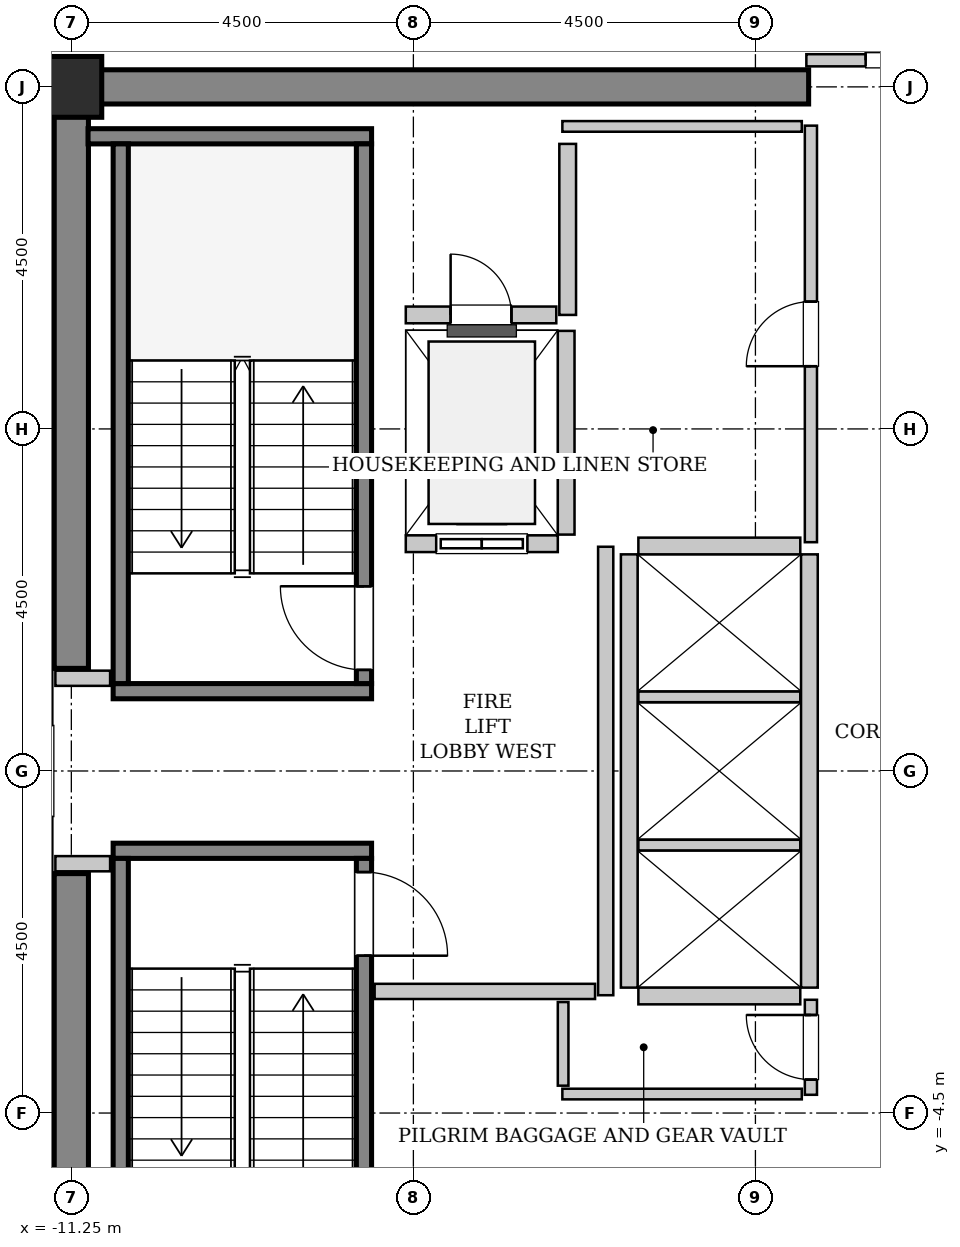
"""IFC4 building model, lengths in metres.
Left out: names, types, materials, properties, quantities, classifications, styles, units other than length and angle.
Written with IfcOpenShell. Run it as: python <this file> out.ifc"""

import sys

from ifc_helpers import new_model, si_unit, direction, frame, frame_2d, origin, origin_2d, place, context, subcontext, project, spatial, rectangle, hollow_rectangle, extrude, source, transform, mapped, element, fill, save


model = new_model("IFC4")
c1 = context("Model", 3, precision=1e-05, world=origin(), true_north=direction((0.0, 1.0)))
c2 = subcontext(c1, "Body", "Model", "MODEL_VIEW")
j1 = project(units=[si_unit("LENGTHUNIT", "METRE"), si_unit("PLANEANGLEUNIT", "RADIAN")], contexts=[c1])
p1 = place(None, origin())
s1 = spatial("IfcSite", under=j1, at=p1, CompositionType="ELEMENT")
p2 = place(p1, origin())
s2 = spatial("IfcBuilding", under=s1, at=p2, CompositionType="ELEMENT")
p3 = place(p2, frame((0.0, 0.0, 240.8)))
s3 = spatial("IfcBuildingStorey", under=s2, at=p3, CompositionType="ELEMENT", Elevation=240.8)
m1 = source(origin(), c2, "Body", "SweptSolid", [
    extrude(rectangle(XDim=9.925, YDim=0.45, at=frame_2d((4.962, 0.0))), origin(), (0.0, 0.0, 1.0), 3.8),
])
p4 = place(p3, frame((-11.475, 9.0, 0.0), z_axis=(0.0, 0.0, 1.0), x_axis=(1.0, 0.0, 0.0)))
e1 = element("IfcWall", 1, at=p4, inside=s3, PredefinedType="SHEAR", context=c2, shape_type="MappedRepresentation", body=[
    mapped(m1, transform((0.0, 0.0, 0.0), x_axis=(1.0, 0.0, 0.0), y_axis=(0.0, 1.0, 0.0), z_axis=(0.0, 0.0, 1.0), scale=1.0)),
])
m2 = source(origin(), c2, "Body", "SweptSolid", [
    extrude(rectangle(XDim=7.425, YDim=0.45, at=frame_2d((3.712, 0.0))), origin(), (0.0, 0.0, 1.0), 3.8),
])
for number, where, z_axis, x_axis in (
    (2, (-11.25, -8.775, 0.0), (0.0, 0.0, 1.0), (0.0, 1.0, 0.0)),
    (3, (-11.25, 1.35, 0.0), (0.0, 0.0, 1.0), (0.0, 1.0, 0.0)),
):
    element("IfcWall", number, at=place(p3, frame(where, z_axis=z_axis, x_axis=x_axis)), inside=s3, PredefinedType="SHEAR", context=c2, shape_type="MappedRepresentation", body=[
        mapped(m2, transform((0.0, 0.0, 0.0), x_axis=(1.0, 0.0, 0.0), y_axis=(0.0, 1.0, 0.0), z_axis=(0.0, 0.0, 1.0), scale=1.0)),
    ])
m3 = source(origin(), c2, "Body", "SweptSolid", [
    extrude(hollow_rectangle(XDim=0.8, YDim=0.8, WallThickness=0.04, InnerFilletRadius=0.04, OuterFilletRadius=0.08, at=origin_2d()), origin(), (0.0, 0.0, 1.0), 3.8),
])
p5 = place(p3, frame((-11.25, 9.0, 0.0), z_axis=(0.0, 0.0, 1.0), x_axis=(1.0, 0.0, 0.0)))
e4 = element("IfcColumn", 4, at=p5, inside=s3, PredefinedType="COLUMN", context=c2, shape_type="MappedRepresentation", body=[
    mapped(m3, transform((0.0, 0.0, 0.0), x_axis=(1.0, 0.0, 0.0), y_axis=(0.0, 1.0, 0.0), z_axis=(0.0, 0.0, 1.0), scale=1.0)),
])
m4 = source(origin(), c2, "Body", "SweptSolid", [
    extrude(rectangle(XDim=3.4, YDim=0.2, at=frame_2d((1.7, 0.0))), origin(), (0.0, 0.0, 1.0), 3.8),
])
p6 = place(p3, frame((-7.3, 1.05, 0.0), z_axis=(0.0, 0.0, 1.0), x_axis=(-1.0, 0.0, 0.0)))
e5 = element("IfcWall", 5, at=p6, inside=s3, PredefinedType="SOLIDWALL", context=c2, shape_type="MappedRepresentation", body=[
    mapped(m4, transform((0.0, 0.0, 0.0), x_axis=(1.0, 0.0, 0.0), y_axis=(0.0, 1.0, 0.0), z_axis=(0.0, 0.0, 1.0), scale=1.0)),
])
m5 = source(origin(), c2, "Body", "SweptSolid", [
    extrude(rectangle(XDim=3.73, YDim=0.2, at=frame_2d((1.865, 0.0))), origin(), (0.0, 0.0, 1.0), 3.8),
])
p7 = place(p3, frame((-7.3, 8.35, 0.0), z_axis=(0.0, 0.0, 1.0), x_axis=(-1.0, 0.0, 0.0)))
e6 = element("IfcWall", 6, at=p7, inside=s3, PredefinedType="SOLIDWALL", context=c2, shape_type="MappedRepresentation", body=[
    mapped(m5, transform((0.0, 0.0, 0.0), x_axis=(1.0, 0.0, 0.0), y_axis=(0.0, 1.0, 0.0), z_axis=(0.0, 0.0, 1.0), scale=1.0)),
])
m6 = source(origin(), c2, "Body", "SweptSolid", [
    extrude(rectangle(XDim=7.1, YDim=0.2, at=frame_2d((3.55, 0.0))), origin(), (0.0, 0.0, 1.0), 3.8),
])
p8 = place(p3, frame((-7.4, 1.15, 0.0), z_axis=(0.0, 0.0, 1.0), x_axis=(0.0, 1.0, 0.0)))
e7 = element("IfcWall", 7, at=p8, inside=s3, PredefinedType="SOLIDWALL", context=c2, shape_type="MappedRepresentation", body=[
    mapped(m6, transform((0.0, 0.0, 0.0), x_axis=(1.0, 0.0, 0.0), y_axis=(0.0, 1.0, 0.0), z_axis=(0.0, 0.0, 1.0), scale=1.0)),
])
p9 = place(p8, frame((0.18, 0.0, 0.0)))
e8 = element("IfcOpeningElement", 8, at=p9, cuts=e7, PredefinedType="OPENING", context=c2, shape_type="SweptSolid", body=[
    extrude(rectangle(XDim=1.1, YDim=2.15, at=frame_2d((0.55, 1.075))), frame((0.0, 0.11, 0.0), z_axis=(0.0, -1.0, 0.0), x_axis=(1.0, 0.0, 0.0)), (0.0, 0.0, 1.0), 0.22),
])
p10 = place(p3, frame((-10.6, 1.15, 0.0), z_axis=(0.0, 0.0, 1.0), x_axis=(0.0, 1.0, 0.0)))
e9 = element("IfcWall", 9, at=p10, inside=s3, PredefinedType="SOLIDWALL", context=c2, shape_type="MappedRepresentation", body=[
    mapped(m6, transform((0.0, 0.0, 0.0), x_axis=(1.0, 0.0, 0.0), y_axis=(0.0, 1.0, 0.0), z_axis=(0.0, 0.0, 1.0), scale=1.0)),
])
p11 = place(p3, frame((-10.7, -1.05, 0.0), z_axis=(0.0, 0.0, 1.0), x_axis=(1.0, 0.0, 0.0)))
e10 = element("IfcWall", 10, at=p11, inside=s3, PredefinedType="SOLIDWALL", context=c2, shape_type="MappedRepresentation", body=[
    mapped(m4, transform((0.0, 0.0, 0.0), x_axis=(1.0, 0.0, 0.0), y_axis=(0.0, 1.0, 0.0), z_axis=(0.0, 0.0, 1.0), scale=1.0)),
])
p12 = place(p3, frame((-10.6, -1.15, 0.0), z_axis=(0.0, 0.0, 1.0), x_axis=(0.0, -1.0, 0.0)))
e11 = element("IfcWall", 11, at=p12, inside=s3, PredefinedType="SOLIDWALL", context=c2, shape_type="MappedRepresentation", body=[
    mapped(m6, transform((0.0, 0.0, 0.0), x_axis=(1.0, 0.0, 0.0), y_axis=(0.0, 1.0, 0.0), z_axis=(0.0, 0.0, 1.0), scale=1.0)),
])
p13 = place(p3, frame((-7.4, -1.15, 0.0), z_axis=(0.0, 0.0, 1.0), x_axis=(0.0, -1.0, 0.0)))
e12 = element("IfcWall", 12, at=p13, inside=s3, PredefinedType="SOLIDWALL", context=c2, shape_type="MappedRepresentation", body=[
    mapped(m6, transform((0.0, 0.0, 0.0), x_axis=(1.0, 0.0, 0.0), y_axis=(0.0, 1.0, 0.0), z_axis=(0.0, 0.0, 1.0), scale=1.0)),
])
p14 = place(p13, frame((0.18, 0.0, 0.0)))
e13 = element("IfcOpeningElement", 13, at=p14, cuts=e12, PredefinedType="OPENING", context=c2, shape_type="SweptSolid", body=[
    extrude(rectangle(XDim=1.1, YDim=2.15, at=frame_2d((0.55, 1.075))), frame((0.0, 0.11, 0.0), z_axis=(0.0, -1.0, 0.0), x_axis=(1.0, 0.0, 0.0)), (0.0, 0.0, 1.0), 0.22),
])
m7 = source(origin(), c2, "Body", "SweptSolid", [
    extrude(rectangle(XDim=2.0, YDim=0.22, at=frame_2d((1.0, 0.0))), origin(), (0.0, 0.0, 1.0), 3.535),
])
p15 = place(p3, frame((-6.85, 2.99, 0.0), z_axis=(0.0, 0.0, 1.0), x_axis=(1.0, 0.0, 0.0)))
e14 = element("IfcWall", 14, at=p15, inside=s3, PredefinedType="SOLIDWALL", context=c2, shape_type="MappedRepresentation", body=[
    mapped(m7, transform((0.0, 0.0, 0.0), x_axis=(1.0, 0.0, 0.0), y_axis=(0.0, 1.0, 0.0), z_axis=(0.0, 0.0, 1.0), scale=1.0)),
])
p16 = place(p15, frame((0.4, 0.0, 0.0)))
e15 = element("IfcOpeningElement", 15, at=p16, cuts=e14, PredefinedType="OPENING", context=c2, shape_type="SweptSolid", body=[
    extrude(rectangle(XDim=1.2, YDim=2.2, at=frame_2d((0.6, 1.1))), frame((0.0, 0.12, 0.0), z_axis=(0.0, -1.0, 0.0), x_axis=(1.0, 0.0, 0.0)), (0.0, 0.0, 1.0), 0.24),
])
m8 = source(origin(), c2, "Body", "SweptSolid", [
    extrude(rectangle(XDim=2.68, YDim=0.22, at=frame_2d((1.34, 0.0))), origin(), (0.0, 0.0, 1.0), 3.535),
])
p17 = place(p3, frame((-4.74, 3.11, 0.0), z_axis=(0.0, 0.0, 1.0), x_axis=(0.0, 1.0, 0.0)))
e16 = element("IfcWall", 16, at=p17, inside=s3, PredefinedType="SOLIDWALL", context=c2, shape_type="MappedRepresentation", body=[
    mapped(m8, transform((0.0, 0.0, 0.0), x_axis=(1.0, 0.0, 0.0), y_axis=(0.0, 1.0, 0.0), z_axis=(0.0, 0.0, 1.0), scale=1.0)),
])
m9 = source(origin(), c2, "Body", "SweptSolid", [
    extrude(rectangle(XDim=5.7, YDim=0.22, at=frame_2d((2.85, 0.0))), origin(), (0.0, 0.0, 1.0), 3.535),
])
for number, where, z_axis, x_axis in (
    (17, (-1.54, -2.85, 0.0), (0.0, 0.0, 1.0), (0.0, 1.0, 0.0)),
    (18, (-3.91, 2.85, 0.0), (0.0, 0.0, 1.0), (0.0, -1.0, 0.0)),
):
    element("IfcWall", number, at=place(p3, frame(where, z_axis=z_axis, x_axis=x_axis)), inside=s3, PredefinedType="SOLIDWALL", context=c2, shape_type="MappedRepresentation", body=[
        mapped(m9, transform((0.0, 0.0, 0.0), x_axis=(1.0, 0.0, 0.0), y_axis=(0.0, 1.0, 0.0), z_axis=(0.0, 0.0, 1.0), scale=1.0)),
    ])
m10 = source(origin(), c2, "Body", "SweptSolid", [
    extrude(rectangle(XDim=2.13, YDim=0.22, at=frame_2d((1.065, 0.0))), origin(), (0.0, 0.0, 1.0), 3.535),
])
p18 = place(p3, frame((-3.79, -2.96, 0.0), z_axis=(0.0, 0.0, 1.0), x_axis=(1.0, 0.0, 0.0)))
e19 = element("IfcWall", 19, at=p18, inside=s3, PredefinedType="SOLIDWALL", context=c2, shape_type="MappedRepresentation", body=[
    mapped(m10, transform((0.0, 0.0, 0.0), x_axis=(1.0, 0.0, 0.0), y_axis=(0.0, 1.0, 0.0), z_axis=(0.0, 0.0, 1.0), scale=1.0)),
])
m11 = source(origin(), c2, "Body", "SweptSolid", [
    extrude(rectangle(XDim=2.13, YDim=0.14, at=frame_2d((1.065, 0.0))), origin(), (0.0, 0.0, 1.0), 3.535),
])
for number, where, z_axis, x_axis in (
    (20, (-3.79, -0.975, 0.0), (0.0, 0.0, 1.0), (1.0, 0.0, 0.0)),
    (21, (-3.79, 0.975, 0.0), (0.0, 0.0, 1.0), (1.0, 0.0, 0.0)),
):
    element("IfcWall", number, at=place(p3, frame(where, z_axis=z_axis, x_axis=x_axis)), inside=s3, PredefinedType="PARTITIONING", context=c2, shape_type="MappedRepresentation", body=[
        mapped(m11, transform((0.0, 0.0, 0.0), x_axis=(1.0, 0.0, 0.0), y_axis=(0.0, 1.0, 0.0), z_axis=(0.0, 0.0, 1.0), scale=1.0)),
    ])
p19 = place(p3, frame((-1.66, 2.96, 0.0), z_axis=(0.0, 0.0, 1.0), x_axis=(-1.0, 0.0, 0.0)))
e22 = element("IfcWall", 22, at=p19, inside=s3, PredefinedType="SOLIDWALL", context=c2, shape_type="MappedRepresentation", body=[
    mapped(m10, transform((0.0, 0.0, 0.0), x_axis=(1.0, 0.0, 0.0), y_axis=(0.0, 1.0, 0.0), z_axis=(0.0, 0.0, 1.0), scale=1.0)),
])
m12 = source(origin(), c2, "Body", "SweptSolid", [
    extrude(rectangle(XDim=2.25, YDim=0.22, at=frame_2d((1.125, 0.0))), origin(), (0.0, 0.0, 1.0), 3.535),
])
p20 = place(p3, frame((-4.72, 6.0, 0.0), z_axis=(0.0, 0.0, 1.0), x_axis=(0.0, 1.0, 0.0)))
e23 = element("IfcWall", 23, at=p20, inside=s3, PredefinedType="SOLIDWALL", context=c2, shape_type="MappedRepresentation", body=[
    mapped(m12, transform((0.0, 0.0, 0.0), x_axis=(1.0, 0.0, 0.0), y_axis=(0.0, 1.0, 0.0), z_axis=(0.0, 0.0, 1.0), scale=1.0)),
])
m13 = source(origin(), c2, "Body", "SweptSolid", [
    extrude(rectangle(XDim=1.98, YDim=0.22, at=frame_2d((0.99, 0.0))), origin(), (0.0, 0.0, 1.0), 3.535),
])
p21 = place(p3, frame((-6.85, 6.0, 0.0), z_axis=(0.0, 0.0, 1.0), x_axis=(1.0, 0.0, 0.0)))
e24 = element("IfcWall", 24, at=p21, inside=s3, PredefinedType="SOLIDWALL", context=c2, shape_type="MappedRepresentation", body=[
    mapped(m13, transform((0.0, 0.0, 0.0), x_axis=(1.0, 0.0, 0.0), y_axis=(0.0, 1.0, 0.0), z_axis=(0.0, 0.0, 1.0), scale=1.0)),
])
p22 = place(p21, frame((0.59, 0.0, 0.0)))
e25 = element("IfcOpeningElement", 25, at=p22, cuts=e24, PredefinedType="OPENING", context=c2, shape_type="SweptSolid", body=[
    extrude(rectangle(XDim=0.8, YDim=2.0, at=frame_2d((0.4, 1.0))), frame((0.0, 0.12, 0.0), z_axis=(0.0, -1.0, 0.0), x_axis=(1.0, 0.0, 0.0)), (0.0, 0.0, 1.0), 0.24),
])
m14 = source(origin(), c2, "Body", "SweptSolid", [
    extrude(rectangle(XDim=5.9, YDim=0.2, at=frame_2d((2.95, 0.0))), origin(), (0.0, 0.0, 1.0), 3.535),
])
p23 = place(p3, frame((-4.22, -2.95, 0.0), z_axis=(0.0, 0.0, 1.0), x_axis=(0.0, 1.0, 0.0)))
e26 = element("IfcWall", 26, at=p23, inside=s3, PredefinedType="PARTITIONING", context=c2, shape_type="MappedRepresentation", body=[
    mapped(m14, transform((0.0, 0.0, 0.0), x_axis=(1.0, 0.0, 0.0), y_axis=(0.0, 1.0, 0.0), z_axis=(0.0, 0.0, 1.0), scale=1.0)),
])
m15 = source(origin(), c2, "Body", "SweptSolid", [
    extrude(rectangle(XDim=2.9, YDim=0.2, at=frame_2d((1.45, 0.0))), origin(), (0.0, 0.0, 1.0), 3.535),
])
p24 = place(p3, frame((-7.26, -2.9, 0.0), z_axis=(0.0, 0.0, 1.0), x_axis=(1.0, 0.0, 0.0)))
e27 = element("IfcWall", 27, at=p24, inside=s3, PredefinedType="PARTITIONING", context=c2, shape_type="MappedRepresentation", body=[
    mapped(m15, transform((0.0, 0.0, 0.0), x_axis=(1.0, 0.0, 0.0), y_axis=(0.0, 1.0, 0.0), z_axis=(0.0, 0.0, 1.0), scale=1.0)),
])
m16 = source(origin(), c2, "Body", "SweptSolid", [
    extrude(rectangle(XDim=0.72, YDim=0.2, at=frame_2d((0.36, 0.0))), origin(), (0.0, 0.0, 1.0), 3.535),
])
for number, where, z_axis, x_axis in (
    (28, (-11.46, 1.22, 0.0), (0.0, 0.0, 1.0), (1.0, 0.0, 0.0)),
    (29, (-11.46, -1.22, 0.0), (0.0, 0.0, 1.0), (1.0, 0.0, 0.0)),
):
    element("IfcWall", number, at=place(p3, frame(where, z_axis=z_axis, x_axis=x_axis)), inside=s3, PredefinedType="PARTITIONING", context=c2, shape_type="MappedRepresentation", body=[
        mapped(m16, transform((0.0, 0.0, 0.0), x_axis=(1.0, 0.0, 0.0), y_axis=(0.0, 1.0, 0.0), z_axis=(0.0, 0.0, 1.0), scale=1.0)),
    ])
m17 = source(origin(), c2, "Body", "SweptSolid", [
    extrude(rectangle(XDim=3.16, YDim=0.16, at=frame_2d((1.58, 0.0))), origin(), (0.0, 0.0, 1.0), 2.625),
])
p25 = place(p3, frame((-1.58, 9.35, 0.0), z_axis=(0.0, 0.0, 1.0), x_axis=(1.0, 0.0, 0.0)))
e30 = element("IfcWall", 30, at=p25, inside=s3, PredefinedType="PARTITIONING", context=c2, shape_type="MappedRepresentation", body=[
    mapped(m17, transform((0.0, 0.0, 0.0), x_axis=(1.0, 0.0, 0.0), y_axis=(0.0, 1.0, 0.0), z_axis=(0.0, 0.0, 1.0), scale=1.0)),
])
p26 = place(p25, frame((0.78, 0.0, 0.0)))
e31 = element("IfcOpeningElement", 31, at=p26, cuts=e30, PredefinedType="OPENING", context=c2, shape_type="SweptSolid", body=[
    extrude(rectangle(XDim=1.6, YDim=2.3, at=frame_2d((0.8, 1.15))), frame((0.0, 0.09, 0.0), z_axis=(0.0, -1.0, 0.0), x_axis=(1.0, 0.0, 0.0)), (0.0, 0.0, 1.0), 0.18),
])
m18 = source(origin(), c2, "Body", "SweptSolid", [
    extrude(rectangle(XDim=5.48, YDim=0.16, at=frame_2d((2.74, 0.0))), origin(), (0.0, 0.0, 1.0), 3.535),
])
p27 = place(p3, frame((-1.52, 3.01, 0.0), z_axis=(0.0, 0.0, 1.0), x_axis=(0.0, 1.0, 0.0)))
e32 = element("IfcWall", 32, at=p27, inside=s3, PredefinedType="PARTITIONING", context=c2, shape_type="MappedRepresentation", body=[
    mapped(m18, transform((0.0, 0.0, 0.0), x_axis=(1.0, 0.0, 0.0), y_axis=(0.0, 1.0, 0.0), z_axis=(0.0, 0.0, 1.0), scale=1.0)),
])
p28 = place(p27, frame((2.315, 0.0, 0.0)))
e33 = element("IfcOpeningElement", 33, at=p28, cuts=e32, PredefinedType="OPENING", context=c2, shape_type="SweptSolid", body=[
    extrude(rectangle(XDim=0.85, YDim=2.1, at=frame_2d((0.425, 1.05))), frame((0.0, 0.09, 0.0), z_axis=(0.0, -1.0, 0.0), x_axis=(1.0, 0.0, 0.0)), (0.0, 0.0, 1.0), 0.18),
])
m19 = source(origin(), c2, "Body", "SweptSolid", [
    extrude(rectangle(XDim=3.15, YDim=0.14, at=frame_2d((1.575, 0.0))), origin(), (0.0, 0.0, 1.0), 3.535),
])
p29 = place(p3, frame((-4.79, 8.48, 0.0), z_axis=(0.0, 0.0, 1.0), x_axis=(1.0, 0.0, 0.0)))
e34 = element("IfcWall", 34, at=p29, inside=s3, PredefinedType="PARTITIONING", context=c2, shape_type="MappedRepresentation", body=[
    mapped(m19, transform((0.0, 0.0, 0.0), x_axis=(1.0, 0.0, 0.0), y_axis=(0.0, 1.0, 0.0), z_axis=(0.0, 0.0, 1.0), scale=1.0)),
])
m20 = source(origin(), c2, "Body", "SweptSolid", [
    extrude(rectangle(XDim=1.25, YDim=0.16, at=frame_2d((0.625, 0.0))), origin(), (0.0, 0.0, 1.0), 3.535),
])
p30 = place(p3, frame((-1.52, -4.26, 0.0), z_axis=(0.0, 0.0, 1.0), x_axis=(0.0, 1.0, 0.0)))
e35 = element("IfcWall", 35, at=p30, inside=s3, PredefinedType="PARTITIONING", context=c2, shape_type="MappedRepresentation", body=[
    mapped(m20, transform((0.0, 0.0, 0.0), x_axis=(1.0, 0.0, 0.0), y_axis=(0.0, 1.0, 0.0), z_axis=(0.0, 0.0, 1.0), scale=1.0)),
])
p31 = place(p30, frame((0.2, 0.0, 0.0)))
e36 = element("IfcOpeningElement", 36, at=p31, cuts=e35, PredefinedType="OPENING", context=c2, shape_type="SweptSolid", body=[
    extrude(rectangle(XDim=0.85, YDim=2.1, at=frame_2d((0.425, 1.05))), frame((0.0, 0.09, 0.0), z_axis=(0.0, -1.0, 0.0), x_axis=(1.0, 0.0, 0.0)), (0.0, 0.0, 1.0), 0.18),
])
p32 = place(p3, frame((-4.79, -4.25, 0.0), z_axis=(0.0, 0.0, 1.0), x_axis=(1.0, 0.0, 0.0)))
e37 = element("IfcWall", 37, at=p32, inside=s3, PredefinedType="PARTITIONING", context=c2, shape_type="MappedRepresentation", body=[
    mapped(m19, transform((0.0, 0.0, 0.0), x_axis=(1.0, 0.0, 0.0), y_axis=(0.0, 1.0, 0.0), z_axis=(0.0, 0.0, 1.0), scale=1.0)),
])
m21 = source(origin(), c2, "Body", "SweptSolid", [
    extrude(rectangle(XDim=1.1, YDim=0.14, at=frame_2d((0.55, 0.0))), origin(), (0.0, 0.0, 1.0), 3.535),
])
p33 = place(p3, frame((-4.78, -4.14, 0.0), z_axis=(0.0, 0.0, 1.0), x_axis=(0.0, 1.0, 0.0)))
e38 = element("IfcWall", 38, at=p33, inside=s3, PredefinedType="PARTITIONING", context=c2, shape_type="MappedRepresentation", body=[
    mapped(m21, transform((0.0, 0.0, 0.0), x_axis=(1.0, 0.0, 0.0), y_axis=(0.0, 1.0, 0.0), z_axis=(0.0, 0.0, 1.0), scale=1.0)),
])
m22 = source(origin(), c2, "Body", "SweptSolid", [
    extrude(rectangle(XDim=1.1, YDim=2.15, at=frame_2d((0.55, 1.075))), frame((0.0, 0.025, 0.0), z_axis=(0.0, -1.0, 0.0), x_axis=(1.0, 0.0, 0.0)), (0.0, 0.0, 1.0), 0.05),
])
p34 = place(p9, origin())
e39 = element("IfcDoor", 39, at=p34, inside=s3, OperationType="SINGLE_SWING_RIGHT", PredefinedType="DOOR", context=c2, shape_type="MappedRepresentation", body=[
    mapped(m22, transform((0.0, 0.0, 0.0), x_axis=(1.0, 0.0, 0.0), y_axis=(0.0, 1.0, 0.0), z_axis=(0.0, 0.0, 1.0), scale=1.0)),
])
fill(e8, e39)
p35 = place(p14, origin())
e40 = element("IfcDoor", 40, at=p35, inside=s3, OperationType="SINGLE_SWING_RIGHT", PredefinedType="DOOR", context=c2, shape_type="MappedRepresentation", body=[
    mapped(m22, transform((0.0, 0.0, 0.0), x_axis=(1.0, 0.0, 0.0), y_axis=(0.0, 1.0, 0.0), z_axis=(0.0, 0.0, 1.0), scale=1.0)),
])
fill(e13, e40)
m23 = source(origin(), c2, "Body", "SweptSolid", [
    extrude(rectangle(XDim=1.2, YDim=2.2, at=frame_2d((0.6, 1.1))), frame((0.0, 0.025, 0.0), z_axis=(0.0, -1.0, 0.0), x_axis=(1.0, 0.0, 0.0)), (0.0, 0.0, 1.0), 0.05),
])
p36 = place(p16, origin())
e41 = element("IfcDoor", 41, at=p36, inside=s3, OperationType="SLIDING_TO_LEFT", PredefinedType="DOOR", context=c2, shape_type="MappedRepresentation", body=[
    mapped(m23, transform((0.0, 0.0, 0.0), x_axis=(1.0, 0.0, 0.0), y_axis=(0.0, 1.0, 0.0), z_axis=(0.0, 0.0, 1.0), scale=1.0)),
])
fill(e15, e41)
m24 = source(origin(), c2, "Body", "SweptSolid", [
    extrude(rectangle(XDim=0.8, YDim=2.0, at=frame_2d((0.4, 1.0))), frame((0.0, 0.025, 0.0), z_axis=(0.0, -1.0, 0.0), x_axis=(1.0, 0.0, 0.0)), (0.0, 0.0, 1.0), 0.05),
])
p37 = place(p22, origin())
e42 = element("IfcDoor", 42, at=p37, inside=s3, OperationType="SINGLE_SWING_LEFT", PredefinedType="TRAPDOOR", context=c2, shape_type="MappedRepresentation", body=[
    mapped(m24, transform((0.0, 0.0, 0.0), x_axis=(1.0, 0.0, 0.0), y_axis=(0.0, 1.0, 0.0), z_axis=(0.0, 0.0, 1.0), scale=1.0)),
])
fill(e25, e42)
m25 = source(origin(), c2, "Body", "SweptSolid", [
    extrude(rectangle(XDim=1.6, YDim=2.3, at=frame_2d((0.8, 1.15))), frame((0.0, 0.025, 0.0), z_axis=(0.0, -1.0, 0.0), x_axis=(1.0, 0.0, 0.0)), (0.0, 0.0, 1.0), 0.05),
])
p38 = place(p26, origin())
e43 = element("IfcDoor", 43, at=p38, inside=s3, OperationType="DOUBLE_DOOR_SINGLE_SWING", PredefinedType="DOOR", context=c2, shape_type="MappedRepresentation", body=[
    mapped(m25, transform((0.0, 0.0, 0.0), x_axis=(1.0, 0.0, 0.0), y_axis=(0.0, 1.0, 0.0), z_axis=(0.0, 0.0, 1.0), scale=1.0)),
])
fill(e31, e43)
m26 = source(origin(), c2, "Body", "SweptSolid", [
    extrude(rectangle(XDim=0.85, YDim=2.1, at=frame_2d((0.425, 1.05))), frame((0.0, 0.025, 0.0), z_axis=(0.0, -1.0, 0.0), x_axis=(1.0, 0.0, 0.0)), (0.0, 0.0, 1.0), 0.05),
])
p39 = place(p28, origin())
e44 = element("IfcDoor", 44, at=p39, inside=s3, OperationType="SINGLE_SWING_LEFT", PredefinedType="DOOR", context=c2, shape_type="MappedRepresentation", body=[
    mapped(m26, transform((0.0, 0.0, 0.0), x_axis=(1.0, 0.0, 0.0), y_axis=(0.0, 1.0, 0.0), z_axis=(0.0, 0.0, 1.0), scale=1.0)),
])
fill(e33, e44)
p40 = place(p31, origin())
e45 = element("IfcDoor", 45, at=p40, inside=s3, OperationType="SINGLE_SWING_RIGHT", PredefinedType="DOOR", context=c2, shape_type="MappedRepresentation", body=[
    mapped(m26, transform((0.0, 0.0, 0.0), x_axis=(1.0, 0.0, 0.0), y_axis=(0.0, 1.0, 0.0), z_axis=(0.0, 0.0, 1.0), scale=1.0)),
])
fill(e36, e45)
save(model, sys.argv[1])
